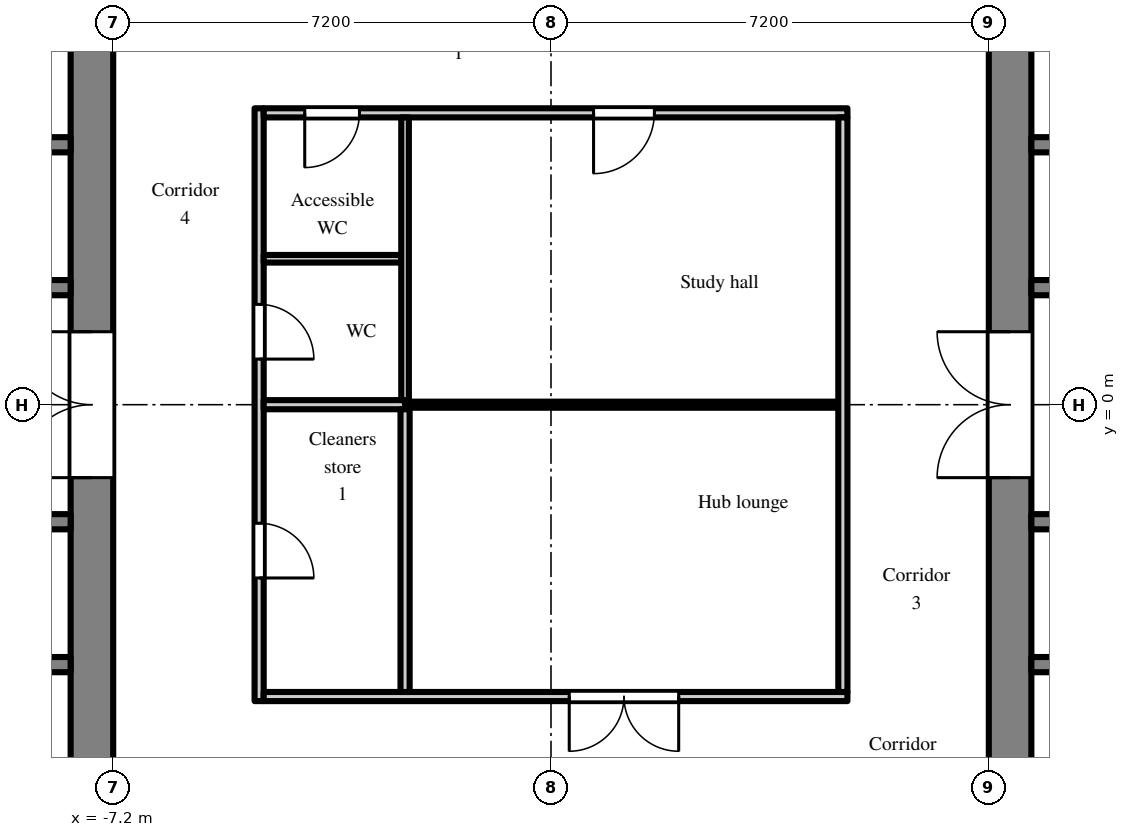
"""IFC4 building model, lengths in metres.
Left out: names, types, materials, properties, quantities, classifications, styles, units other than length and angle.
Written with IfcOpenShell. Run it as: python <this file> out.ifc"""

import sys

from ifc_helpers import new_model, si_unit, direction, frame, frame_2d, origin, place, context, subcontext, project, spatial, rectangle, extrude, element, fill, save


model = new_model("IFC4")
c1 = context("Model", 3, precision=1e-05, world=origin(), true_north=direction((0.0, 1.0)))
c2 = subcontext(c1, "Body", "Model", "MODEL_VIEW")
j1 = project(units=[si_unit("LENGTHUNIT", "METRE"), si_unit("PLANEANGLEUNIT", "RADIAN")], contexts=[c1])
p1 = place(None, origin())
s1 = spatial("IfcSite", under=j1, at=p1, CompositionType="ELEMENT")
p2 = place(p1, origin())
s2 = spatial("IfcBuilding", under=s1, at=p2, CompositionType="ELEMENT")
p3 = place(p2, frame((0.0, 0.0, 147.3)))
s3 = spatial("IfcBuildingStorey", under=s2, at=p3, CompositionType="ELEMENT", Elevation=147.3)
p4 = place(p3, frame((7.55, -7.2, 0.0), z_axis=(0.0, 0.0, 1.0), x_axis=(0.0, 1.0, 0.0)))
e1 = element("IfcWall", 1, at=p4, inside=s3, PredefinedType="SHEAR", context=c2, shape_type="SweptSolid", body=[
    extrude(rectangle(XDim=14.4, YDim=0.7, at=frame_2d((7.2, 0.0))), origin(), (0.0, 0.0, 1.0), 2.6),
])
p5 = place(p4, frame((6.0, 0.0, 0.0)))
e2 = element("IfcOpeningElement", 2, at=p5, cuts=e1, PredefinedType="OPENING", context=c2, shape_type="SweptSolid", body=[
    extrude(rectangle(XDim=2.4, YDim=2.2, at=frame_2d((1.2, 1.1))), frame((0.0, 0.36, 0.0), z_axis=(0.0, -1.0, 0.0), x_axis=(1.0, 0.0, 0.0)), (0.0, 0.0, 1.0), 0.72),
])
p6 = place(p3, frame((7.9, 1.925, 0.0), z_axis=(0.0, 0.0, 1.0), x_axis=(1.0, 0.0, 0.0)))
e3 = element("IfcWall", 3, at=p6, inside=s3, PredefinedType="SHEAR", context=c2, shape_type="SweptSolid", body=[
    extrude(rectangle(XDim=12.95, YDim=0.25, at=frame_2d((6.475, 0.0))), origin(), (0.0, 0.0, 1.0), 2.6),
])
p7 = place(p6, frame((4.825, 0.0, 0.0)))
e4 = element("IfcOpeningElement", 4, at=p7, cuts=e3, PredefinedType="OPENING", context=c2, shape_type="SweptSolid", body=[
    extrude(rectangle(XDim=1.1, YDim=2.1, at=frame_2d((0.55, 1.05))), frame((0.0, 0.135, 0.0), z_axis=(0.0, -1.0, 0.0), x_axis=(1.0, 0.0, 0.0)), (0.0, 0.0, 1.0), 0.27),
])
p8 = place(p6, frame((7.025, 0.0, 0.0)))
e5 = element("IfcOpeningElement", 5, at=p8, cuts=e3, PredefinedType="OPENING", context=c2, shape_type="SweptSolid", body=[
    extrude(rectangle(XDim=1.1, YDim=2.1, at=frame_2d((0.55, 1.05))), frame((0.0, 0.135, 0.0), z_axis=(0.0, -1.0, 0.0), x_axis=(1.0, 0.0, 0.0)), (0.0, 0.0, 1.0), 0.27),
])
p9 = place(p6, frame((9.225, 0.0, 0.0)))
e6 = element("IfcOpeningElement", 6, at=p9, cuts=e3, PredefinedType="OPENING", context=c2, shape_type="SweptSolid", body=[
    extrude(rectangle(XDim=1.1, YDim=2.1, at=frame_2d((0.55, 1.05))), frame((0.0, 0.135, 0.0), z_axis=(0.0, -1.0, 0.0), x_axis=(1.0, 0.0, 0.0)), (0.0, 0.0, 1.0), 0.27),
])
p10 = place(p6, frame((0.525, 0.0, 0.0)))
e7 = element("IfcOpeningElement", 7, at=p10, cuts=e3, PredefinedType="OPENING", context=c2, shape_type="SweptSolid", body=[
    extrude(rectangle(XDim=0.9, YDim=2.1, at=frame_2d((0.45, 1.05))), frame((0.0, 0.135, 0.0), z_axis=(0.0, -1.0, 0.0), x_axis=(1.0, 0.0, 0.0)), (0.0, 0.0, 1.0), 0.27),
])
p11 = place(p6, frame((2.625, 0.0, 0.0)))
e8 = element("IfcOpeningElement", 8, at=p11, cuts=e3, PredefinedType="OPENING", context=c2, shape_type="SweptSolid", body=[
    extrude(rectangle(XDim=1.1, YDim=2.1, at=frame_2d((0.55, 1.05))), frame((0.0, 0.135, 0.0), z_axis=(0.0, -1.0, 0.0), x_axis=(1.0, 0.0, 0.0)), (0.0, 0.0, 1.0), 0.27),
])
p12 = place(p6, frame((11.525, 0.0, 0.0)))
e9 = element("IfcOpeningElement", 9, at=p12, cuts=e3, PredefinedType="OPENING", context=c2, shape_type="SweptSolid", body=[
    extrude(rectangle(XDim=0.9, YDim=2.1, at=frame_2d((0.45, 1.05))), frame((0.0, 0.135, 0.0), z_axis=(0.0, -1.0, 0.0), x_axis=(1.0, 0.0, 0.0)), (0.0, 0.0, 1.0), 0.27),
])
p13 = place(p3, frame((7.9, 4.275, 0.0), z_axis=(0.0, 0.0, 1.0), x_axis=(1.0, 0.0, 0.0)))
e10 = element("IfcWall", 10, at=p13, inside=s3, PredefinedType="SHEAR", context=c2, shape_type="SweptSolid", body=[
    extrude(rectangle(XDim=1.95, YDim=0.25, at=frame_2d((0.975, 0.0))), origin(), (0.0, 0.0, 1.0), 2.6),
])
p14 = place(p3, frame((7.9, -1.925, 0.0), z_axis=(0.0, 0.0, 1.0), x_axis=(1.0, 0.0, 0.0)))
e11 = element("IfcWall", 11, at=p14, inside=s3, PredefinedType="SHEAR", context=c2, shape_type="SweptSolid", body=[
    extrude(rectangle(XDim=12.95, YDim=0.25, at=frame_2d((6.475, 0.0))), origin(), (0.0, 0.0, 1.0), 2.6),
])
p15 = place(p14, frame((0.525, 0.0, 0.0)))
e12 = element("IfcOpeningElement", 12, at=p15, cuts=e11, PredefinedType="OPENING", context=c2, shape_type="SweptSolid", body=[
    extrude(rectangle(XDim=0.9, YDim=2.1, at=frame_2d((0.45, 1.05))), frame((0.0, 0.135, 0.0), z_axis=(0.0, -1.0, 0.0), x_axis=(1.0, 0.0, 0.0)), (0.0, 0.0, 1.0), 0.27),
])
p16 = place(p14, frame((2.625, 0.0, 0.0)))
e13 = element("IfcOpeningElement", 13, at=p16, cuts=e11, PredefinedType="OPENING", context=c2, shape_type="SweptSolid", body=[
    extrude(rectangle(XDim=1.1, YDim=2.1, at=frame_2d((0.55, 1.05))), frame((0.0, 0.135, 0.0), z_axis=(0.0, -1.0, 0.0), x_axis=(1.0, 0.0, 0.0)), (0.0, 0.0, 1.0), 0.27),
])
p17 = place(p14, frame((4.925, 0.0, 0.0)))
e14 = element("IfcOpeningElement", 14, at=p17, cuts=e11, PredefinedType="OPENING", context=c2, shape_type="SweptSolid", body=[
    extrude(rectangle(XDim=0.9, YDim=2.1, at=frame_2d((0.45, 1.05))), frame((0.0, 0.135, 0.0), z_axis=(0.0, -1.0, 0.0), x_axis=(1.0, 0.0, 0.0)), (0.0, 0.0, 1.0), 0.27),
])
p18 = place(p14, frame((8.225, 0.0, 0.0)))
e15 = element("IfcOpeningElement", 15, at=p18, cuts=e11, PredefinedType="OPENING", context=c2, shape_type="SweptSolid", body=[
    extrude(rectangle(XDim=0.9, YDim=2.1, at=frame_2d((0.45, 1.05))), frame((0.0, 0.135, 0.0), z_axis=(0.0, -1.0, 0.0), x_axis=(1.0, 0.0, 0.0)), (0.0, 0.0, 1.0), 0.27),
])
p19 = place(p14, frame((11.525, 0.0, 0.0)))
e16 = element("IfcOpeningElement", 16, at=p19, cuts=e11, PredefinedType="OPENING", context=c2, shape_type="SweptSolid", body=[
    extrude(rectangle(XDim=0.9, YDim=2.1, at=frame_2d((0.45, 1.05))), frame((0.0, 0.135, 0.0), z_axis=(0.0, -1.0, 0.0), x_axis=(1.0, 0.0, 0.0)), (0.0, 0.0, 1.0), 0.27),
])
p20 = place(p3, frame((7.9, -4.275, 0.0), z_axis=(0.0, 0.0, 1.0), x_axis=(1.0, 0.0, 0.0)))
e17 = element("IfcWall", 17, at=p20, inside=s3, PredefinedType="SHEAR", context=c2, shape_type="SweptSolid", body=[
    extrude(rectangle(XDim=1.95, YDim=0.25, at=frame_2d((0.975, 0.0))), origin(), (0.0, 0.0, 1.0), 2.6),
])
p21 = place(p3, frame((-7.55, -7.2, 0.0), z_axis=(0.0, 0.0, 1.0), x_axis=(0.0, 1.0, 0.0)))
e18 = element("IfcWall", 18, at=p21, inside=s3, PredefinedType="SHEAR", context=c2, shape_type="SweptSolid", body=[
    extrude(rectangle(XDim=14.4, YDim=0.7, at=frame_2d((7.2, 0.0))), origin(), (0.0, 0.0, 1.0), 2.6),
])
p22 = place(p21, frame((6.0, 0.0, 0.0)))
e19 = element("IfcOpeningElement", 19, at=p22, cuts=e18, PredefinedType="OPENING", context=c2, shape_type="SweptSolid", body=[
    extrude(rectangle(XDim=2.4, YDim=2.2, at=frame_2d((1.2, 1.1))), frame((0.0, 0.36, 0.0), z_axis=(0.0, -1.0, 0.0), x_axis=(1.0, 0.0, 0.0)), (0.0, 0.0, 1.0), 0.72),
])
p23 = place(p3, frame((-7.9, 1.925, 0.0), z_axis=(0.0, 0.0, 1.0), x_axis=(-1.0, 0.0, 0.0)))
e20 = element("IfcWall", 20, at=p23, inside=s3, PredefinedType="SHEAR", context=c2, shape_type="SweptSolid", body=[
    extrude(rectangle(XDim=12.95, YDim=0.25, at=frame_2d((6.475, 0.0))), origin(), (0.0, 0.0, 1.0), 2.6),
])
p24 = place(p23, frame((4.825, 0.0, 0.0)))
e21 = element("IfcOpeningElement", 21, at=p24, cuts=e20, PredefinedType="OPENING", context=c2, shape_type="SweptSolid", body=[
    extrude(rectangle(XDim=1.1, YDim=2.1, at=frame_2d((0.55, 1.05))), frame((0.0, 0.135, 0.0), z_axis=(0.0, -1.0, 0.0), x_axis=(1.0, 0.0, 0.0)), (0.0, 0.0, 1.0), 0.27),
])
p25 = place(p23, frame((7.025, 0.0, 0.0)))
e22 = element("IfcOpeningElement", 22, at=p25, cuts=e20, PredefinedType="OPENING", context=c2, shape_type="SweptSolid", body=[
    extrude(rectangle(XDim=1.1, YDim=2.1, at=frame_2d((0.55, 1.05))), frame((0.0, 0.135, 0.0), z_axis=(0.0, -1.0, 0.0), x_axis=(1.0, 0.0, 0.0)), (0.0, 0.0, 1.0), 0.27),
])
p26 = place(p23, frame((9.225, 0.0, 0.0)))
e23 = element("IfcOpeningElement", 23, at=p26, cuts=e20, PredefinedType="OPENING", context=c2, shape_type="SweptSolid", body=[
    extrude(rectangle(XDim=1.1, YDim=2.1, at=frame_2d((0.55, 1.05))), frame((0.0, 0.135, 0.0), z_axis=(0.0, -1.0, 0.0), x_axis=(1.0, 0.0, 0.0)), (0.0, 0.0, 1.0), 0.27),
])
p27 = place(p23, frame((0.525, 0.0, 0.0)))
e24 = element("IfcOpeningElement", 24, at=p27, cuts=e20, PredefinedType="OPENING", context=c2, shape_type="SweptSolid", body=[
    extrude(rectangle(XDim=0.9, YDim=2.1, at=frame_2d((0.45, 1.05))), frame((0.0, 0.135, 0.0), z_axis=(0.0, -1.0, 0.0), x_axis=(1.0, 0.0, 0.0)), (0.0, 0.0, 1.0), 0.27),
])
p28 = place(p23, frame((2.625, 0.0, 0.0)))
e25 = element("IfcOpeningElement", 25, at=p28, cuts=e20, PredefinedType="OPENING", context=c2, shape_type="SweptSolid", body=[
    extrude(rectangle(XDim=1.1, YDim=2.1, at=frame_2d((0.55, 1.05))), frame((0.0, 0.135, 0.0), z_axis=(0.0, -1.0, 0.0), x_axis=(1.0, 0.0, 0.0)), (0.0, 0.0, 1.0), 0.27),
])
p29 = place(p23, frame((11.525, 0.0, 0.0)))
e26 = element("IfcOpeningElement", 26, at=p29, cuts=e20, PredefinedType="OPENING", context=c2, shape_type="SweptSolid", body=[
    extrude(rectangle(XDim=0.9, YDim=2.1, at=frame_2d((0.45, 1.05))), frame((0.0, 0.135, 0.0), z_axis=(0.0, -1.0, 0.0), x_axis=(1.0, 0.0, 0.0)), (0.0, 0.0, 1.0), 0.27),
])
p30 = place(p3, frame((-7.9, 4.275, 0.0), z_axis=(0.0, 0.0, 1.0), x_axis=(-1.0, 0.0, 0.0)))
e27 = element("IfcWall", 27, at=p30, inside=s3, PredefinedType="SHEAR", context=c2, shape_type="SweptSolid", body=[
    extrude(rectangle(XDim=1.95, YDim=0.25, at=frame_2d((0.975, 0.0))), origin(), (0.0, 0.0, 1.0), 2.6),
])
p31 = place(p3, frame((-7.9, -1.925, 0.0), z_axis=(0.0, 0.0, 1.0), x_axis=(-1.0, 0.0, 0.0)))
e28 = element("IfcWall", 28, at=p31, inside=s3, PredefinedType="SHEAR", context=c2, shape_type="SweptSolid", body=[
    extrude(rectangle(XDim=12.95, YDim=0.25, at=frame_2d((6.475, 0.0))), origin(), (0.0, 0.0, 1.0), 2.6),
])
p32 = place(p31, frame((0.525, 0.0, 0.0)))
e29 = element("IfcOpeningElement", 29, at=p32, cuts=e28, PredefinedType="OPENING", context=c2, shape_type="SweptSolid", body=[
    extrude(rectangle(XDim=0.9, YDim=2.1, at=frame_2d((0.45, 1.05))), frame((0.0, 0.135, 0.0), z_axis=(0.0, -1.0, 0.0), x_axis=(1.0, 0.0, 0.0)), (0.0, 0.0, 1.0), 0.27),
])
p33 = place(p31, frame((2.625, 0.0, 0.0)))
e30 = element("IfcOpeningElement", 30, at=p33, cuts=e28, PredefinedType="OPENING", context=c2, shape_type="SweptSolid", body=[
    extrude(rectangle(XDim=1.1, YDim=2.1, at=frame_2d((0.55, 1.05))), frame((0.0, 0.135, 0.0), z_axis=(0.0, -1.0, 0.0), x_axis=(1.0, 0.0, 0.0)), (0.0, 0.0, 1.0), 0.27),
])
p34 = place(p31, frame((4.925, 0.0, 0.0)))
e31 = element("IfcOpeningElement", 31, at=p34, cuts=e28, PredefinedType="OPENING", context=c2, shape_type="SweptSolid", body=[
    extrude(rectangle(XDim=0.9, YDim=2.1, at=frame_2d((0.45, 1.05))), frame((0.0, 0.135, 0.0), z_axis=(0.0, -1.0, 0.0), x_axis=(1.0, 0.0, 0.0)), (0.0, 0.0, 1.0), 0.27),
])
p35 = place(p31, frame((8.225, 0.0, 0.0)))
e32 = element("IfcOpeningElement", 32, at=p35, cuts=e28, PredefinedType="OPENING", context=c2, shape_type="SweptSolid", body=[
    extrude(rectangle(XDim=0.9, YDim=2.1, at=frame_2d((0.45, 1.05))), frame((0.0, 0.135, 0.0), z_axis=(0.0, -1.0, 0.0), x_axis=(1.0, 0.0, 0.0)), (0.0, 0.0, 1.0), 0.27),
])
p36 = place(p31, frame((11.525, 0.0, 0.0)))
e33 = element("IfcOpeningElement", 33, at=p36, cuts=e28, PredefinedType="OPENING", context=c2, shape_type="SweptSolid", body=[
    extrude(rectangle(XDim=0.9, YDim=2.1, at=frame_2d((0.45, 1.05))), frame((0.0, 0.135, 0.0), z_axis=(0.0, -1.0, 0.0), x_axis=(1.0, 0.0, 0.0)), (0.0, 0.0, 1.0), 0.27),
])
p37 = place(p3, frame((-7.9, -4.275, 0.0), z_axis=(0.0, 0.0, 1.0), x_axis=(-1.0, 0.0, 0.0)))
e34 = element("IfcWall", 34, at=p37, inside=s3, PredefinedType="SHEAR", context=c2, shape_type="SweptSolid", body=[
    extrude(rectangle(XDim=1.95, YDim=0.25, at=frame_2d((0.975, 0.0))), origin(), (0.0, 0.0, 1.0), 2.6),
])
p38 = place(p3, frame((-4.8, -4.875, 0.0), z_axis=(0.0, 0.0, 1.0), x_axis=(0.0, 1.0, 0.0)))
e35 = element("IfcWall", 35, at=p38, inside=s3, PredefinedType="PARTITIONING", context=c2, shape_type="SweptSolid", body=[
    extrude(rectangle(XDim=9.75, YDim=0.15, at=frame_2d((4.875, 0.0))), origin(), (0.0, 0.0, 1.0), 2.6),
])
p39 = place(p38, frame((5.625, 0.0, 0.0)))
e36 = element("IfcOpeningElement", 36, at=p39, cuts=e35, PredefinedType="OPENING", context=c2, shape_type="SweptSolid", body=[
    extrude(rectangle(XDim=0.9, YDim=2.1, at=frame_2d((0.45, 1.05))), frame((0.0, 0.085, 0.0), z_axis=(0.0, -1.0, 0.0), x_axis=(1.0, 0.0, 0.0)), (0.0, 0.0, 1.0), 0.17),
])
p40 = place(p38, frame((2.025, 0.0, 0.0)))
e37 = element("IfcOpeningElement", 37, at=p40, cuts=e35, PredefinedType="OPENING", context=c2, shape_type="SweptSolid", body=[
    extrude(rectangle(XDim=0.9, YDim=2.1, at=frame_2d((0.45, 1.05))), frame((0.0, 0.085, 0.0), z_axis=(0.0, -1.0, 0.0), x_axis=(1.0, 0.0, 0.0)), (0.0, 0.0, 1.0), 0.17),
])
p41 = place(p3, frame((-4.725, -4.8, 0.0), z_axis=(0.0, 0.0, 1.0), x_axis=(1.0, 0.0, 0.0)))
e38 = element("IfcWall", 38, at=p41, inside=s3, PredefinedType="PARTITIONING", context=c2, shape_type="SweptSolid", body=[
    extrude(rectangle(XDim=9.6, YDim=0.15, at=frame_2d((4.8, 0.0))), origin(), (0.0, 0.0, 1.0), 2.6),
])
p42 = place(p41, frame((5.025, 0.0, 0.0)))
e39 = element("IfcOpeningElement", 39, at=p42, cuts=e38, PredefinedType="OPENING", context=c2, shape_type="SweptSolid", body=[
    extrude(rectangle(XDim=1.8, YDim=2.1, at=frame_2d((0.9, 1.05))), frame((0.0, 0.085, 0.0), z_axis=(0.0, -1.0, 0.0), x_axis=(1.0, 0.0, 0.0)), (0.0, 0.0, 1.0), 0.17),
])
p43 = place(p3, frame((-4.725, 0.0, 0.0), z_axis=(0.0, 0.0, 1.0), x_axis=(1.0, 0.0, 0.0)))
e40 = element("IfcWall", 40, at=p43, inside=s3, PredefinedType="PARTITIONING", context=c2, shape_type="SweptSolid", body=[
    extrude(rectangle(XDim=2.325, YDim=0.15, at=frame_2d((1.163, 0.0))), origin(), (0.0, 0.0, 1.0), 2.6),
])
p44 = place(p3, frame((-4.725, 2.4, 0.0), z_axis=(0.0, 0.0, 1.0), x_axis=(1.0, 0.0, 0.0)))
e41 = element("IfcWall", 41, at=p44, inside=s3, PredefinedType="PARTITIONING", context=c2, shape_type="SweptSolid", body=[
    extrude(rectangle(XDim=2.263, YDim=0.125, at=frame_2d((1.131, 0.0))), origin(), (0.0, 0.0, 1.0), 2.6),
])
p45 = place(p3, frame((-4.725, 4.8, 0.0), z_axis=(0.0, 0.0, 1.0), x_axis=(1.0, 0.0, 0.0)))
e42 = element("IfcWall", 42, at=p45, inside=s3, PredefinedType="PARTITIONING", context=c2, shape_type="SweptSolid", body=[
    extrude(rectangle(XDim=9.6, YDim=0.15, at=frame_2d((4.8, 0.0))), origin(), (0.0, 0.0, 1.0), 2.6),
])
p46 = place(p45, frame((0.675, 0.0, 0.0)))
e43 = element("IfcOpeningElement", 43, at=p46, cuts=e42, PredefinedType="OPENING", context=c2, shape_type="SweptSolid", body=[
    extrude(rectangle(XDim=0.9, YDim=2.1, at=frame_2d((0.45, 1.05))), frame((0.0, 0.085, 0.0), z_axis=(0.0, -1.0, 0.0), x_axis=(1.0, 0.0, 0.0)), (0.0, 0.0, 1.0), 0.17),
])
p47 = place(p45, frame((5.425, 0.0, 0.0)))
e44 = element("IfcOpeningElement", 44, at=p47, cuts=e42, PredefinedType="OPENING", context=c2, shape_type="SweptSolid", body=[
    extrude(rectangle(XDim=1.0, YDim=2.1, at=frame_2d((0.5, 1.05))), frame((0.0, 0.085, 0.0), z_axis=(0.0, -1.0, 0.0), x_axis=(1.0, 0.0, 0.0)), (0.0, 0.0, 1.0), 0.17),
])
p48 = place(p3, frame((-2.4, -4.725, 0.0), z_axis=(0.0, 0.0, 1.0), x_axis=(0.0, 1.0, 0.0)))
e45 = element("IfcWall", 45, at=p48, inside=s3, PredefinedType="PARTITIONING", context=c2, shape_type="SweptSolid", body=[
    extrude(rectangle(XDim=4.65, YDim=0.15, at=frame_2d((2.325, 0.0))), origin(), (0.0, 0.0, 1.0), 2.6),
])
p49 = place(p3, frame((-2.4, 0.075, 0.0), z_axis=(0.0, 0.0, 1.0), x_axis=(0.0, 1.0, 0.0)))
e46 = element("IfcWall", 46, at=p49, inside=s3, PredefinedType="PARTITIONING", context=c2, shape_type="SweptSolid", body=[
    extrude(rectangle(XDim=4.65, YDim=0.125, at=frame_2d((2.325, 0.0))), origin(), (0.0, 0.0, 1.0), 2.6),
])
p50 = place(p3, frame((-2.4, 0.0, 0.0), z_axis=(0.0, 0.0, 1.0), x_axis=(1.0, 0.0, 0.0)))
e47 = element("IfcWall", 47, at=p50, inside=s3, PredefinedType="PARTITIONING", context=c2, shape_type="SweptSolid", body=[
    extrude(rectangle(XDim=7.125, YDim=0.1, at=frame_2d((3.562, 0.0))), origin(), (0.0, 0.0, 1.0), 2.6),
])
p51 = place(p3, frame((4.8, -4.725, 0.0), z_axis=(0.0, 0.0, 1.0), x_axis=(0.0, 1.0, 0.0)))
e48 = element("IfcWall", 48, at=p51, inside=s3, PredefinedType="PARTITIONING", context=c2, shape_type="SweptSolid", body=[
    extrude(rectangle(XDim=9.45, YDim=0.15, at=frame_2d((4.725, 0.0))), origin(), (0.0, 0.0, 1.0), 2.6),
])
p52 = place(p5, origin())
e49 = element("IfcDoor", 49, at=p52, inside=s3, OperationType="DOUBLE_DOOR_DOUBLE_SWING", PredefinedType="DOOR", context=c2, shape_type="SweptSolid", body=[
    extrude(rectangle(XDim=2.4, YDim=2.2, at=frame_2d((1.2, 1.1))), frame((0.0, 0.025, 0.0), z_axis=(0.0, -1.0, 0.0), x_axis=(1.0, 0.0, 0.0)), (0.0, 0.0, 1.0), 0.05),
])
fill(e2, e49)
p53 = place(p22, origin())
e50 = element("IfcDoor", 50, at=p53, inside=s3, OperationType="DOUBLE_DOOR_DOUBLE_SWING", PredefinedType="DOOR", context=c2, shape_type="SweptSolid", body=[
    extrude(rectangle(XDim=2.4, YDim=2.2, at=frame_2d((1.2, 1.1))), frame((0.0, 0.025, 0.0), z_axis=(0.0, -1.0, 0.0), x_axis=(1.0, 0.0, 0.0)), (0.0, 0.0, 1.0), 0.05),
])
fill(e19, e50)
p54 = place(p46, frame((0.9, 0.0, 0.0), z_axis=(0.0, 0.0, 1.0), x_axis=(-1.0, 0.0, 0.0)))
e51 = element("IfcDoor", 51, at=p54, inside=s3, OperationType="SINGLE_SWING_RIGHT", PredefinedType="DOOR", context=c2, shape_type="SweptSolid", body=[
    extrude(rectangle(XDim=0.9, YDim=2.1, at=frame_2d((0.45, 1.05))), frame((0.0, 0.025, 0.0), z_axis=(0.0, -1.0, 0.0), x_axis=(1.0, 0.0, 0.0)), (0.0, 0.0, 1.0), 0.05),
])
fill(e43, e51)
p55 = place(p39, frame((0.9, 0.0, 0.0), z_axis=(0.0, 0.0, 1.0), x_axis=(-1.0, 0.0, 0.0)))
e52 = element("IfcDoor", 52, at=p55, inside=s3, OperationType="SINGLE_SWING_RIGHT", PredefinedType="DOOR", context=c2, shape_type="SweptSolid", body=[
    extrude(rectangle(XDim=0.9, YDim=2.1, at=frame_2d((0.45, 1.05))), frame((0.0, 0.025, 0.0), z_axis=(0.0, -1.0, 0.0), x_axis=(1.0, 0.0, 0.0)), (0.0, 0.0, 1.0), 0.05),
])
fill(e36, e52)
p56 = place(p40, frame((0.9, 0.0, 0.0), z_axis=(0.0, 0.0, 1.0), x_axis=(-1.0, 0.0, 0.0)))
e53 = element("IfcDoor", 53, at=p56, inside=s3, OperationType="SINGLE_SWING_RIGHT", PredefinedType="DOOR", context=c2, shape_type="SweptSolid", body=[
    extrude(rectangle(XDim=0.9, YDim=2.1, at=frame_2d((0.45, 1.05))), frame((0.0, 0.025, 0.0), z_axis=(0.0, -1.0, 0.0), x_axis=(1.0, 0.0, 0.0)), (0.0, 0.0, 1.0), 0.05),
])
fill(e37, e53)
p57 = place(p47, frame((1.0, 0.0, 0.0), z_axis=(0.0, 0.0, 1.0), x_axis=(-1.0, 0.0, 0.0)))
e54 = element("IfcDoor", 54, at=p57, inside=s3, OperationType="SINGLE_SWING_RIGHT", PredefinedType="DOOR", context=c2, shape_type="SweptSolid", body=[
    extrude(rectangle(XDim=1.0, YDim=2.1, at=frame_2d((0.5, 1.05))), frame((0.0, 0.025, 0.0), z_axis=(0.0, -1.0, 0.0), x_axis=(1.0, 0.0, 0.0)), (0.0, 0.0, 1.0), 0.05),
])
fill(e44, e54)
p58 = place(p42, frame((1.8, 0.0, 0.0), z_axis=(0.0, 0.0, 1.0), x_axis=(-1.0, 0.0, 0.0)))
e55 = element("IfcDoor", 55, at=p58, inside=s3, OperationType="DOUBLE_DOOR_DOUBLE_SWING", PredefinedType="DOOR", context=c2, shape_type="SweptSolid", body=[
    extrude(rectangle(XDim=1.8, YDim=2.1, at=frame_2d((0.9, 1.05))), frame((0.0, 0.025, 0.0), z_axis=(0.0, -1.0, 0.0), x_axis=(1.0, 0.0, 0.0)), (0.0, 0.0, 1.0), 0.05),
])
fill(e39, e55)
save(model, sys.argv[1])
